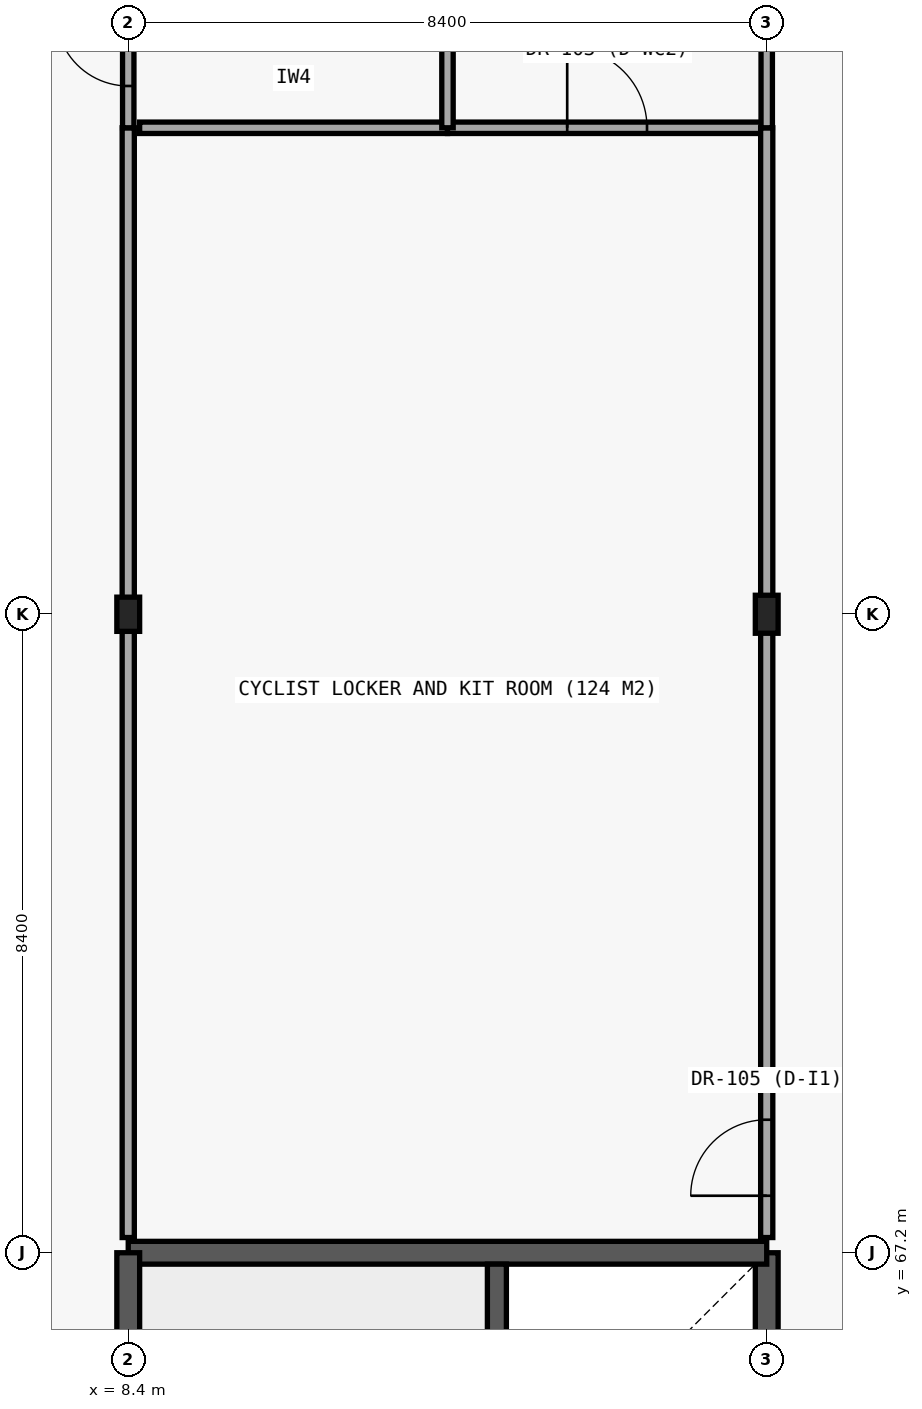
"""IFC4 building model, lengths in metres.
Left out: names, types, materials, properties, quantities, classifications, styles, units other than length and angle.
Written with IfcOpenShell. Run it as: python <this file> out.ifc"""

import sys

from ifc_helpers import new_model, si_unit, direction, frame, frame_2d, origin, origin_2d, place, context, subcontext, project, spatial, rectangle, i_section, extrude, element, fill, save


model = new_model("IFC4")
c1 = context("Model", 3, precision=1e-05, world=origin(), true_north=direction((0.0, 1.0)))
c2 = subcontext(c1, "Body", "Model", "MODEL_VIEW")
j1 = project(units=[si_unit("LENGTHUNIT", "METRE"), si_unit("PLANEANGLEUNIT", "RADIAN")], contexts=[c1])
p1 = place(None, origin())
s1 = spatial("IfcSite", under=j1, at=p1, CompositionType="ELEMENT")
p2 = place(p1, origin())
s2 = spatial("IfcBuilding", under=s1, at=p2, CompositionType="ELEMENT")
p3 = place(p2, origin())
s3 = spatial("IfcBuildingStorey", under=s2, at=p3, CompositionType="ELEMENT", Elevation=0.0)
p4 = place(p3, frame((16.8, 58.8, 0.0), z_axis=(0.0, 0.0, 1.0), x_axis=(0.0, 1.0, 0.0)))
e1 = element("IfcWall", 1, at=p4, inside=s3, PredefinedType="SHEAR", context=c2, shape_type="SweptSolid", body=[
    extrude(rectangle(XDim=8.4, YDim=0.3, at=frame_2d((4.2, 0.0))), origin(), (0.0, 0.0, 1.0), 4.8),
])
p5 = place(p3, frame((16.8, 67.2, 0.0), z_axis=(0.0, 0.0, 1.0), x_axis=(-1.0, 0.0, 0.0)))
e2 = element("IfcWall", 2, at=p5, inside=s3, PredefinedType="SHEAR", context=c2, shape_type="SweptSolid", body=[
    extrude(rectangle(XDim=8.4, YDim=0.3, at=frame_2d((4.2, 0.0))), origin(), (0.0, 0.0, 1.0), 4.8),
])
p6 = place(p3, frame((8.4, 67.2, 0.0), z_axis=(0.0, 0.0, 1.0), x_axis=(0.0, -1.0, 0.0)))
e3 = element("IfcWall", 3, at=p6, inside=s3, PredefinedType="SHEAR", context=c2, shape_type="SweptSolid", body=[
    extrude(rectangle(XDim=8.4, YDim=0.3, at=frame_2d((4.2, 0.0))), origin(), (0.0, 0.0, 1.0), 4.8),
])
p7 = place(p3, frame((13.25, 58.95, 0.0), z_axis=(0.0, 0.0, 1.0), x_axis=(0.0, 1.0, 0.0)))
e4 = element("IfcWall", 4, at=p7, inside=s3, PredefinedType="SHEAR", context=c2, shape_type="SweptSolid", body=[
    extrude(rectangle(XDim=8.1, YDim=0.25, at=frame_2d((4.05, 0.0))), origin(), (0.0, 0.0, 1.0), 4.8),
])
p8 = place(p3, frame((8.4, 75.6, 0.0), z_axis=(0.0, 0.0, 1.0), x_axis=(1.0, 0.0, 0.0)))
e5 = element("IfcColumn", 5, at=p8, inside=s3, PredefinedType="COLUMN", context=c2, shape_type="SweptSolid", body=[
    extrude(i_section(OverallWidth=0.3, OverallDepth=0.45, WebThickness=0.014, FlangeThickness=0.026, FilletRadius=0.027, at=origin_2d()), origin(), (0.0, 0.0, 1.0), 4.8),
])
p9 = place(p3, frame((16.8, 75.6, 0.0), z_axis=(0.0, 0.0, 1.0), x_axis=(1.0, 0.0, 0.0)))
e6 = element("IfcColumn", 6, at=p9, inside=s3, PredefinedType="COLUMN", context=c2, shape_type="SweptSolid", body=[
    extrude(i_section(OverallWidth=0.3, OverallDepth=0.5, WebThickness=0.014, FlangeThickness=0.028, FilletRadius=0.027, at=origin_2d()), origin(), (0.0, 0.0, 1.0), 4.8),
])
p10 = place(p3, frame((8.55, 82.0, 0.0), z_axis=(0.0, 0.0, 1.0), x_axis=(1.0, 0.0, 0.0)))
e7 = element("IfcWall", 7, at=p10, inside=s3, PredefinedType="PARTITIONING", context=c2, shape_type="SweptSolid", body=[
    extrude(rectangle(XDim=4.05, YDim=0.15, at=frame_2d((2.025, 0.0))), origin(), (0.0, 0.0, 1.0), 4.1),
])
p11 = place(p3, frame((12.6, 82.0, 0.0), z_axis=(0.0, 0.0, 1.0), x_axis=(1.0, 0.0, 0.0)))
e8 = element("IfcWall", 8, at=p11, inside=s3, PredefinedType="PARTITIONING", context=c2, shape_type="SweptSolid", body=[
    extrude(rectangle(XDim=4.2, YDim=0.15, at=frame_2d((2.1, 0.0))), origin(), (0.0, 0.0, 1.0), 4.1),
])
p12 = place(p11, frame((1.575, 0.0, 0.0)))
e9 = element("IfcOpeningElement", 9, at=p12, cuts=e8, PredefinedType="OPENING", context=c2, shape_type="SweptSolid", body=[
    extrude(rectangle(XDim=1.05, YDim=2.15, at=frame_2d((0.525, 1.075))), frame((0.0, 0.085, 0.0), z_axis=(0.0, -1.0, 0.0), x_axis=(1.0, 0.0, 0.0)), (0.0, 0.0, 1.0), 0.17),
])
p13 = place(p3, frame((8.4, 67.4, 0.0), z_axis=(0.0, 0.0, 1.0), x_axis=(0.0, 1.0, 0.0)))
e10 = element("IfcWall", 10, at=p13, inside=s3, PredefinedType="PARTITIONING", context=c2, shape_type="SweptSolid", body=[
    extrude(rectangle(XDim=14.6, YDim=0.16, at=frame_2d((7.3, 0.0))), origin(), (0.0, 0.0, 1.0), 4.1),
])
p14 = place(p3, frame((8.4, 82.0, 0.0), z_axis=(0.0, 0.0, 1.0), x_axis=(0.0, 1.0, 0.0)))
e11 = element("IfcWall", 11, at=p14, inside=s3, PredefinedType="PARTITIONING", context=c2, shape_type="SweptSolid", body=[
    extrude(rectangle(XDim=5.2, YDim=0.15, at=frame_2d((2.6, 0.0))), origin(), (0.0, 0.0, 1.0), 4.1),
])
p15 = place(p14, frame((0.55, 0.0, 0.0)))
e12 = element("IfcOpeningElement", 12, at=p15, cuts=e11, PredefinedType="OPENING", context=c2, shape_type="SweptSolid", body=[
    extrude(rectangle(XDim=0.95, YDim=2.1, at=frame_2d((0.475, 1.05))), frame((0.0, 0.085, 0.0), z_axis=(0.0, -1.0, 0.0), x_axis=(1.0, 0.0, 0.0)), (0.0, 0.0, 1.0), 0.17),
])
p16 = place(p3, frame((12.6, 82.0, 0.0), z_axis=(0.0, 0.0, 1.0), x_axis=(0.0, 1.0, 0.0)))
e13 = element("IfcWall", 13, at=p16, inside=s3, PredefinedType="PARTITIONING", context=c2, shape_type="SweptSolid", body=[
    extrude(rectangle(XDim=5.2, YDim=0.15, at=frame_2d((2.6, 0.0))), origin(), (0.0, 0.0, 1.0), 4.1),
])
p17 = place(p3, frame((16.8, 67.4, 0.0), z_axis=(0.0, 0.0, 1.0), x_axis=(0.0, 1.0, 0.0)))
e14 = element("IfcWall", 14, at=p17, inside=s3, PredefinedType="PARTITIONING", context=c2, shape_type="SweptSolid", body=[
    extrude(rectangle(XDim=14.6, YDim=0.16, at=frame_2d((7.3, 0.0))), origin(), (0.0, 0.0, 1.0), 4.1),
])
p18 = place(p17, frame((0.55, 0.0, 0.0)))
e15 = element("IfcOpeningElement", 15, at=p18, cuts=e14, PredefinedType="OPENING", context=c2, shape_type="SweptSolid", body=[
    extrude(rectangle(XDim=1.0, YDim=2.15, at=frame_2d((0.5, 1.075))), frame((0.0, 0.09, 0.0), z_axis=(0.0, -1.0, 0.0), x_axis=(1.0, 0.0, 0.0)), (0.0, 0.0, 1.0), 0.18),
])
p19 = place(p3, frame((16.8, 82.0, 0.0), z_axis=(0.0, 0.0, 1.0), x_axis=(0.0, 1.0, 0.0)))
e16 = element("IfcWall", 16, at=p19, inside=s3, PredefinedType="PARTITIONING", context=c2, shape_type="SweptSolid", body=[
    extrude(rectangle(XDim=5.2, YDim=0.15, at=frame_2d((2.6, 0.0))), origin(), (0.0, 0.0, 1.0), 4.1),
])
p20 = place(p12, origin())
e17 = element("IfcDoor", 17, at=p20, inside=s3, OperationType="SINGLE_SWING_LEFT", PredefinedType="DOOR", context=c2, shape_type="SweptSolid", body=[
    extrude(rectangle(XDim=1.05, YDim=2.15, at=frame_2d((0.525, 1.075))), frame((0.0, 0.025, 0.0), z_axis=(0.0, -1.0, 0.0), x_axis=(1.0, 0.0, 0.0)), (0.0, 0.0, 1.0), 0.05),
])
fill(e9, e17)
p21 = place(p15, origin())
e18 = element("IfcDoor", 18, at=p21, inside=s3, OperationType="SINGLE_SWING_RIGHT", PredefinedType="DOOR", context=c2, shape_type="SweptSolid", body=[
    extrude(rectangle(XDim=0.95, YDim=2.1, at=frame_2d((0.475, 1.05))), frame((0.0, 0.025, 0.0), z_axis=(0.0, -1.0, 0.0), x_axis=(1.0, 0.0, 0.0)), (0.0, 0.0, 1.0), 0.05),
])
fill(e12, e18)
p22 = place(p18, origin())
e19 = element("IfcDoor", 19, at=p22, inside=s3, OperationType="SINGLE_SWING_LEFT", PredefinedType="DOOR", context=c2, shape_type="SweptSolid", body=[
    extrude(rectangle(XDim=1.0, YDim=2.15, at=frame_2d((0.5, 1.075))), frame((0.0, 0.025, 0.0), z_axis=(0.0, -1.0, 0.0), x_axis=(1.0, 0.0, 0.0)), (0.0, 0.0, 1.0), 0.05),
])
fill(e15, e19)
save(model, sys.argv[1])
